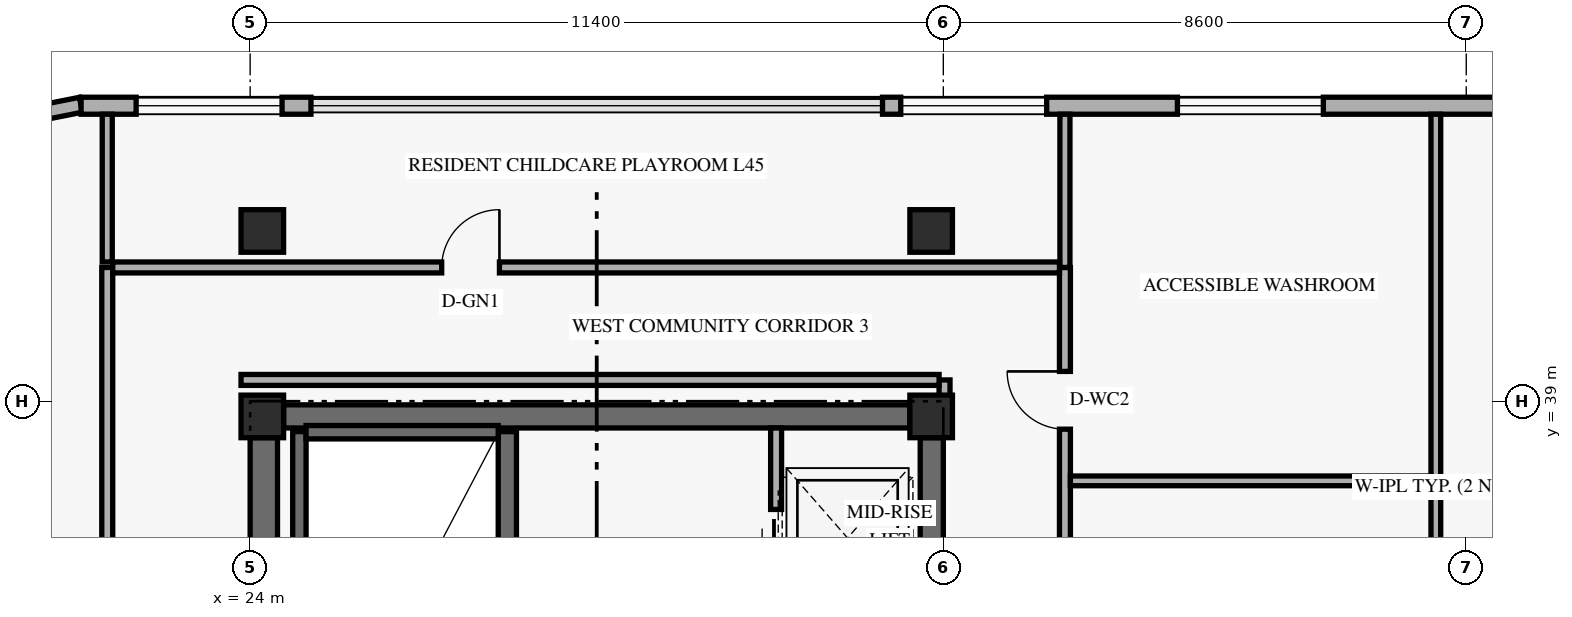
"""IFC4 building model, lengths in metres.
Left out: names, types, materials, properties, quantities, classifications, styles, units other than length and angle.
Written with IfcOpenShell. Run it as: python <this file> out.ifc"""

import sys

from ifc_helpers import new_model, si_unit, direction, frame, frame_2d, origin, origin_2d, place, context, subcontext, project, spatial, rectangle, extrude, element, fill, save


model = new_model("IFC4")
c1 = context("Model", 3, precision=1e-05, world=origin(), true_north=direction((0.0, 1.0)))
c2 = subcontext(c1, "Body", "Model", "MODEL_VIEW")
j1 = project(units=[si_unit("LENGTHUNIT", "METRE"), si_unit("PLANEANGLEUNIT", "RADIAN")], contexts=[c1])
p1 = place(None, origin())
s1 = spatial("IfcSite", under=j1, at=p1, CompositionType="ELEMENT")
p2 = place(p1, origin())
s2 = spatial("IfcBuilding", under=s1, at=p2, CompositionType="ELEMENT")
p3 = place(p2, frame((0.0, 0.0, 173.4)))
s3 = spatial("IfcBuildingStorey", under=s2, at=p3, CompositionType="ELEMENT", Elevation=173.4)
p4 = place(p3, frame((24.225, 30.55, 0.0), z_axis=(0.0, 0.0, 1.0), x_axis=(0.0, 1.0, 0.0)))
e1 = element("IfcWall", 1, at=p4, inside=s3, PredefinedType="SHEAR", context=c2, shape_type="SweptSolid", body=[
    extrude(rectangle(XDim=7.85, YDim=0.45, at=frame_2d((3.925, 0.0))), origin(), (0.0, 0.0, 1.0), 3.348),
])
p5 = place(p3, frame((35.21, 31.35, 0.0), z_axis=(0.0, 0.0, 1.0), x_axis=(0.0, 1.0, 0.0)))
e2 = element("IfcWall", 2, at=p5, inside=s3, PredefinedType="SHEAR", context=c2, shape_type="SweptSolid", body=[
    extrude(rectangle(XDim=7.05, YDim=0.38, at=frame_2d((3.525, 0.0))), origin(), (0.0, 0.0, 1.0), 3.348),
])
p6 = place(p3, frame((24.55, 38.75, 0.0), z_axis=(0.0, 0.0, 1.0), x_axis=(1.0, 0.0, 0.0)))
e3 = element("IfcWall", 3, at=p6, inside=s3, PredefinedType="SHEAR", context=c2, shape_type="SweptSolid", body=[
    extrude(rectangle(XDim=10.3, YDim=0.38, at=frame_2d((5.15, 0.0))), origin(), (0.0, 0.0, 1.0), 3.96),
])
p7 = place(p3, frame((24.81, 30.74, 0.0), z_axis=(0.0, 0.0, 1.0), x_axis=(0.0, 1.0, 0.0)))
e4 = element("IfcWall", 4, at=p7, inside=s3, PredefinedType="SHEAR", context=c2, shape_type="SweptSolid", body=[
    extrude(rectangle(XDim=7.76, YDim=0.22, at=frame_2d((3.88, 0.0))), origin(), (0.0, 0.0, 1.0), 3.96),
])
p8 = place(p3, frame((28.23, 30.74, 0.0), z_axis=(0.0, 0.0, 1.0), x_axis=(0.0, 1.0, 0.0)))
e5 = element("IfcWall", 5, at=p8, inside=s3, PredefinedType="SHEAR", context=c2, shape_type="SweptSolid", body=[
    extrude(rectangle(XDim=7.76, YDim=0.3, at=frame_2d((3.88, 0.0))), origin(), (0.0, 0.0, 1.0), 3.96),
])
p9 = place(p3, frame((24.92, 38.49, 0.0), z_axis=(0.0, 0.0, 1.0), x_axis=(1.0, 0.0, 0.0)))
e6 = element("IfcWall", 6, at=p9, inside=s3, PredefinedType="SHEAR", context=c2, shape_type="SweptSolid", body=[
    extrude(rectangle(XDim=3.16, YDim=0.22, at=frame_2d((1.58, 0.0))), origin(), (0.0, 0.0, 1.0), 3.96),
])
for number, where, z_axis, x_axis in (
    (7, (24.2, 38.75, 0.0), (0.0, 0.0, 1.0), (1.0, 0.0, 0.0)),
    (8, (24.2, 41.8, 0.0), (0.0, 0.0, 1.0), (1.0, 0.0, 0.0)),
    (9, (35.2, 38.75, 0.0), (0.0, 0.0, 1.0), (1.0, 0.0, 0.0)),
    (10, (35.2, 41.8, 0.0), (0.0, 0.0, 1.0), (1.0, 0.0, 0.0)),
):
    element("IfcColumn", number, at=place(p3, frame(where, z_axis=z_axis, x_axis=x_axis)), inside=s3, PredefinedType="COLUMN", context=c2, shape_type="SweptSolid", body=[
        extrude(rectangle(XDim=0.7, YDim=0.7, at=origin_2d()), origin(), (0.0, 0.0, 1.0), 4.2),
    ])
p10 = place(p3, frame((21.217, 43.876, 0.0), z_axis=(0.0, 0.0, 1.0), x_axis=(-0.980809899341, -0.19496651342, 0.0)))
e11 = element("IfcWall", 11, at=p10, inside=s3, PredefinedType="SOLIDWALL", context=c2, shape_type="SweptSolid", body=[
    extrude(rectangle(XDim=1.389, YDim=0.25, at=frame_2d((0.694, 0.0))), origin(), (0.0, 0.0, 1.0), 3.96),
])
p11 = place(p3, frame((54.98, 43.86, 0.0), z_axis=(0.0, 0.0, 1.0), x_axis=(-1.0, 0.0, 0.0)))
e12 = element("IfcWall", 12, at=p11, inside=s3, PredefinedType="SOLIDWALL", context=c2, shape_type="SweptSolid", body=[
    extrude(rectangle(XDim=20.58, YDim=0.28, at=frame_2d((10.29, 0.0))), origin(), (0.0, 0.0, 1.0), 3.96),
])
p12 = place(p11, frame((17.88, 0.0, 0.85)))
e13 = element("IfcOpeningElement", 13, at=p12, cuts=e12, PredefinedType="OPENING", context=c2, shape_type="SweptSolid", body=[
    extrude(rectangle(XDim=2.4, YDim=1.9, at=frame_2d((1.2, 0.95))), frame((0.0, 0.15, 0.0), z_axis=(0.0, -1.0, 0.0), x_axis=(1.0, 0.0, 0.0)), (0.0, 0.0, 1.0), 0.3),
])
p13 = place(p11, frame((13.33, 0.0, 0.85)))
e14 = element("IfcOpeningElement", 14, at=p13, cuts=e12, PredefinedType="OPENING", context=c2, shape_type="SweptSolid", body=[
    extrude(rectangle(XDim=2.4, YDim=1.9, at=frame_2d((1.2, 0.95))), frame((0.0, 0.15, 0.0), z_axis=(0.0, -1.0, 0.0), x_axis=(1.0, 0.0, 0.0)), (0.0, 0.0, 1.0), 0.3),
])
p14 = place(p11, frame((4.54, 0.0, 0.85)))
e15 = element("IfcOpeningElement", 15, at=p14, cuts=e12, PredefinedType="OPENING", context=c2, shape_type="SweptSolid", body=[
    extrude(rectangle(XDim=2.4, YDim=1.9, at=frame_2d((1.2, 0.95))), frame((0.0, 0.15, 0.0), z_axis=(0.0, -1.0, 0.0), x_axis=(1.0, 0.0, 0.0)), (0.0, 0.0, 1.0), 0.3),
])
p15 = place(p3, frame((25.0, 43.86, 0.0), z_axis=(0.0, 0.0, 1.0), x_axis=(-1.0, 0.0, 0.0)))
e16 = element("IfcWall", 16, at=p15, inside=s3, PredefinedType="SOLIDWALL", context=c2, shape_type="SweptSolid", body=[
    extrude(rectangle(XDim=3.78, YDim=0.28, at=frame_2d((1.89, 0.0))), origin(), (0.0, 0.0, 1.0), 3.96),
])
p16 = place(p15, frame((0.475, 0.0, 0.85)))
e17 = element("IfcOpeningElement", 17, at=p16, cuts=e16, PredefinedType="OPENING", context=c2, shape_type="SweptSolid", body=[
    extrude(rectangle(XDim=2.4, YDim=1.9, at=frame_2d((1.2, 0.95))), frame((0.0, 0.15, 0.0), z_axis=(0.0, -1.0, 0.0), x_axis=(1.0, 0.0, 0.0)), (0.0, 0.0, 1.0), 0.3),
])
p17 = place(p3, frame((32.65, 31.35, 0.0), z_axis=(0.0, 0.0, 1.0), x_axis=(0.0, 1.0, 0.0)))
e18 = element("IfcWall", 18, at=p17, inside=s3, PredefinedType="STANDARD", context=c2, shape_type="SweptSolid", body=[
    extrude(rectangle(XDim=7.21, YDim=0.18, at=frame_2d((3.605, 0.0))), origin(), (0.0, 0.0, 1.0), 3.96),
])
p18 = place(p17, frame((0.52, 0.0, 0.0)))
e19 = element("IfcOpeningElement", 19, at=p18, cuts=e18, PredefinedType="OPENING", context=c2, shape_type="SweptSolid", body=[
    extrude(rectangle(XDim=1.05, YDim=2.2, at=frame_2d((0.525, 1.1))), frame((0.0, 0.1, 0.0), z_axis=(0.0, -1.0, 0.0), x_axis=(1.0, 0.0, 0.0)), (0.0, 0.0, 1.0), 0.2),
])
p19 = place(p17, frame((2.67, 0.0, 0.0)))
e20 = element("IfcOpeningElement", 20, at=p19, cuts=e18, PredefinedType="OPENING", context=c2, shape_type="SweptSolid", body=[
    extrude(rectangle(XDim=1.05, YDim=2.2, at=frame_2d((0.525, 1.1))), frame((0.0, 0.1, 0.0), z_axis=(0.0, -1.0, 0.0), x_axis=(1.0, 0.0, 0.0)), (0.0, 0.0, 1.0), 0.2),
])
p20 = place(p17, frame((4.82, 0.0, 0.0)))
e21 = element("IfcOpeningElement", 21, at=p20, cuts=e18, PredefinedType="OPENING", context=c2, shape_type="SweptSolid", body=[
    extrude(rectangle(XDim=1.05, YDim=2.2, at=frame_2d((0.525, 1.1))), frame((0.0, 0.1, 0.0), z_axis=(0.0, -1.0, 0.0), x_axis=(1.0, 0.0, 0.0)), (0.0, 0.0, 1.0), 0.2),
])
p21 = place(p3, frame((37.4, 6.8, 0.0), z_axis=(0.0, 0.0, 1.0), x_axis=(0.0, 1.0, 0.0)))
e22 = element("IfcWall", 22, at=p21, inside=s3, PredefinedType="STANDARD", context=c2, shape_type="SweptSolid", body=[
    extrude(rectangle(XDim=34.4, YDim=0.18, at=frame_2d((17.2, 0.0))), origin(), (0.0, 0.0, 1.0), 3.33),
])
p22 = place(p21, frame((25.43, 0.0, 0.0)))
e23 = element("IfcOpeningElement", 23, at=p22, cuts=e22, PredefinedType="OPENING", context=c2, shape_type="SweptSolid", body=[
    extrude(rectangle(XDim=0.92, YDim=2.14, at=frame_2d((0.46, 1.07))), frame((0.0, 0.1, 0.0), z_axis=(0.0, -1.0, 0.0), x_axis=(1.0, 0.0, 0.0)), (0.0, 0.0, 1.0), 0.2),
])
p23 = place(p21, frame((31.74, 0.0, 0.0)))
e24 = element("IfcOpeningElement", 24, at=p23, cuts=e22, PredefinedType="OPENING", context=c2, shape_type="SweptSolid", body=[
    extrude(rectangle(XDim=0.95, YDim=2.14, at=frame_2d((0.475, 1.07))), frame((0.0, 0.1, 0.0), z_axis=(0.0, -1.0, 0.0), x_axis=(1.0, 0.0, 0.0)), (0.0, 0.0, 1.0), 0.2),
])
p24 = place(p21, frame((2.8, 0.0, 0.0)))
e25 = element("IfcOpeningElement", 25, at=p24, cuts=e22, PredefinedType="OPENING", context=c2, shape_type="SweptSolid", body=[
    extrude(rectangle(XDim=1.15, YDim=2.15, at=frame_2d((0.575, 1.075))), frame((0.0, 0.1, 0.0), z_axis=(0.0, -1.0, 0.0), x_axis=(1.0, 0.0, 0.0)), (0.0, 0.0, 1.0), 0.2),
])
p25 = place(p21, frame((21.6, 0.0, 0.0)))
e26 = element("IfcOpeningElement", 26, at=p25, cuts=e22, PredefinedType="OPENING", context=c2, shape_type="SweptSolid", body=[
    extrude(rectangle(XDim=1.15, YDim=2.15, at=frame_2d((0.575, 1.075))), frame((0.0, 0.1, 0.0), z_axis=(0.0, -1.0, 0.0), x_axis=(1.0, 0.0, 0.0)), (0.0, 0.0, 1.0), 0.2),
])
p26 = place(p3, frame((37.4, 41.2, 0.0), z_axis=(0.0, 0.0, 1.0), x_axis=(0.0, 1.0, 0.0)))
e27 = element("IfcWall", 27, at=p26, inside=s3, PredefinedType="PARTITIONING", context=c2, shape_type="SweptSolid", body=[
    extrude(rectangle(XDim=2.52, YDim=0.165, at=frame_2d((1.26, 0.0))), origin(), (0.0, 0.0, 1.0), 3.479),
])
p27 = place(p3, frame((35.42, 38.75, 0.0), z_axis=(0.0, 0.0, 1.0), x_axis=(0.0, 1.0, 0.0)))
e28 = element("IfcWall", 28, at=p27, inside=s3, PredefinedType="STANDARD", context=c2, shape_type="SweptSolid", body=[
    extrude(rectangle(XDim=0.6, YDim=0.18, at=frame_2d((0.3, 0.0))), origin(), (0.0, 0.0, 1.0), 3.33),
])
p28 = place(p3, frame((43.5, 31.462, 0.0), z_axis=(0.0, 0.0, 1.0), x_axis=(0.0, 1.0, 0.0)))
e29 = element("IfcWall", 29, at=p28, inside=s3, PredefinedType="PLUMBINGWALL", context=c2, shape_type="SweptSolid", body=[
    extrude(rectangle(XDim=12.258, YDim=0.16, at=frame_2d((6.129, 0.0))), origin(), (0.0, 0.0, 1.0), 3.33),
])
p29 = place(p28, frame((1.117, 0.0, 0.0)))
e30 = element("IfcOpeningElement", 30, at=p29, cuts=e29, PredefinedType="OPENING", context=c2, shape_type="SweptSolid", body=[
    extrude(rectangle(XDim=0.95, YDim=2.15, at=frame_2d((0.475, 1.075))), frame((0.0, 0.09, 0.0), z_axis=(0.0, -1.0, 0.0), x_axis=(1.0, 0.0, 0.0)), (0.0, 0.0, 1.0), 0.18),
])
p30 = place(p3, frame((37.49, 37.69, 0.0), z_axis=(0.0, 0.0, 1.0), x_axis=(1.0, 0.0, 0.0)))
e31 = element("IfcWall", 31, at=p30, inside=s3, PredefinedType="PLUMBINGWALL", context=c2, shape_type="SweptSolid", body=[
    extrude(rectangle(XDim=5.93, YDim=0.16, at=frame_2d((2.965, 0.0))), origin(), (0.0, 0.0, 1.0), 3.96),
])
p31 = place(p3, frame((21.65, 6.8, 0.0), z_axis=(0.0, 0.0, 1.0), x_axis=(0.0, 1.0, 0.0)))
e32 = element("IfcWall", 32, at=p31, inside=s3, PredefinedType="STANDARD", context=c2, shape_type="SweptSolid", body=[
    extrude(rectangle(XDim=34.4, YDim=0.18, at=frame_2d((17.2, 0.0))), origin(), (0.0, 0.0, 1.0), 3.33),
])
p32 = place(p31, frame((7.5, 0.0, 0.0)))
e33 = element("IfcOpeningElement", 33, at=p32, cuts=e32, PredefinedType="OPENING", context=c2, shape_type="SweptSolid", body=[
    extrude(rectangle(XDim=0.95, YDim=2.15, at=frame_2d((0.475, 1.075))), frame((0.0, 0.1, 0.0), z_axis=(0.0, -1.0, 0.0), x_axis=(1.0, 0.0, 0.0)), (0.0, 0.0, 1.0), 0.2),
])
p33 = place(p31, frame((22.5, 0.0, 0.0)))
e34 = element("IfcOpeningElement", 34, at=p33, cuts=e32, PredefinedType="OPENING", context=c2, shape_type="SweptSolid", body=[
    extrude(rectangle(XDim=0.95, YDim=2.15, at=frame_2d((0.475, 1.075))), frame((0.0, 0.1, 0.0), z_axis=(0.0, -1.0, 0.0), x_axis=(1.0, 0.0, 0.0)), (0.0, 0.0, 1.0), 0.2),
])
p34 = place(p3, frame((21.74, 41.2, 0.0), z_axis=(0.0, 0.0, 1.0), x_axis=(1.0, 0.0, 0.0)))
e35 = element("IfcWall", 35, at=p34, inside=s3, PredefinedType="STANDARD", context=c2, shape_type="SweptSolid", body=[
    extrude(rectangle(XDim=15.57, YDim=0.18, at=frame_2d((7.785, 0.0))), origin(), (0.0, 0.0, 1.0), 3.33),
])
p35 = place(p34, frame((5.41, 0.0, 0.0)))
e36 = element("IfcOpeningElement", 36, at=p35, cuts=e35, PredefinedType="OPENING", context=c2, shape_type="SweptSolid", body=[
    extrude(rectangle(XDim=0.95, YDim=2.15, at=frame_2d((0.475, 1.075))), frame((0.0, 0.1, 0.0), z_axis=(0.0, -1.0, 0.0), x_axis=(1.0, 0.0, 0.0)), (0.0, 0.0, 1.0), 0.2),
])
p36 = place(p3, frame((23.85, 39.35, 0.0), z_axis=(0.0, 0.0, 1.0), x_axis=(1.0, 0.0, 0.0)))
e37 = element("IfcWall", 37, at=p36, inside=s3, PredefinedType="STANDARD", context=c2, shape_type="SweptSolid", body=[
    extrude(rectangle(XDim=11.48, YDim=0.18, at=frame_2d((5.74, 0.0))), origin(), (0.0, 0.0, 1.0), 3.33),
])
p37 = place(p3, frame((21.65, 41.29, 0.0), z_axis=(0.0, 0.0, 1.0), x_axis=(0.0, 1.0, 0.0)))
e38 = element("IfcWall", 38, at=p37, inside=s3, PredefinedType="PARTITIONING", context=c2, shape_type="SweptSolid", body=[
    extrude(rectangle(XDim=2.43, YDim=0.165, at=frame_2d((1.215, 0.0))), origin(), (0.0, 0.0, 1.0), 3.479),
])
p38 = place(p12, origin())
e39 = element("IfcWindow", 39, at=p38, inside=s3, PartitioningType="SINGLE_PANEL", PredefinedType="WINDOW", context=c2, shape_type="SweptSolid", body=[
    extrude(rectangle(XDim=2.4, YDim=1.9, at=frame_2d((1.2, 0.95))), frame((0.0, 0.03, 0.0), z_axis=(0.0, -1.0, 0.0), x_axis=(1.0, 0.0, 0.0)), (0.0, 0.0, 1.0), 0.06),
])
fill(e13, e39)
p39 = place(p13, origin())
e40 = element("IfcWindow", 40, at=p39, inside=s3, PartitioningType="SINGLE_PANEL", PredefinedType="WINDOW", context=c2, shape_type="SweptSolid", body=[
    extrude(rectangle(XDim=2.4, YDim=1.9, at=frame_2d((1.2, 0.95))), frame((0.0, 0.03, 0.0), z_axis=(0.0, -1.0, 0.0), x_axis=(1.0, 0.0, 0.0)), (0.0, 0.0, 1.0), 0.06),
])
fill(e14, e40)
p40 = place(p16, origin())
e41 = element("IfcWindow", 41, at=p40, inside=s3, PartitioningType="SINGLE_PANEL", PredefinedType="WINDOW", context=c2, shape_type="SweptSolid", body=[
    extrude(rectangle(XDim=2.4, YDim=1.9, at=frame_2d((1.2, 0.95))), frame((0.0, 0.03, 0.0), z_axis=(0.0, -1.0, 0.0), x_axis=(1.0, 0.0, 0.0)), (0.0, 0.0, 1.0), 0.06),
])
fill(e17, e41)
p41 = place(p20, origin())
e42 = element("IfcDoor", 42, at=p41, inside=s3, OperationType="SLIDING_TO_LEFT", PredefinedType="DOOR", context=c2, shape_type="SweptSolid", body=[
    extrude(rectangle(XDim=1.05, YDim=2.2, at=frame_2d((0.525, 1.1))), frame((0.0, 0.025, 0.0), z_axis=(0.0, -1.0, 0.0), x_axis=(1.0, 0.0, 0.0)), (0.0, 0.0, 1.0), 0.05),
])
fill(e21, e42)
p42 = place(p23, origin())
e43 = element("IfcDoor", 43, at=p42, inside=s3, OperationType="SINGLE_SWING_RIGHT", PredefinedType="DOOR", context=c2, shape_type="SweptSolid", body=[
    extrude(rectangle(XDim=0.95, YDim=2.14, at=frame_2d((0.475, 1.07))), frame((0.0, 0.025, 0.0), z_axis=(0.0, -1.0, 0.0), x_axis=(1.0, 0.0, 0.0)), (0.0, 0.0, 1.0), 0.05),
])
fill(e24, e43)
p43 = place(p35, origin())
e44 = element("IfcDoor", 44, at=p43, inside=s3, OperationType="SINGLE_SWING_RIGHT", PredefinedType="DOOR", context=c2, shape_type="SweptSolid", body=[
    extrude(rectangle(XDim=0.95, YDim=2.15, at=frame_2d((0.475, 1.075))), frame((0.0, 0.025, 0.0), z_axis=(0.0, -1.0, 0.0), x_axis=(1.0, 0.0, 0.0)), (0.0, 0.0, 1.0), 0.05),
])
fill(e36, e44)
save(model, sys.argv[1])
